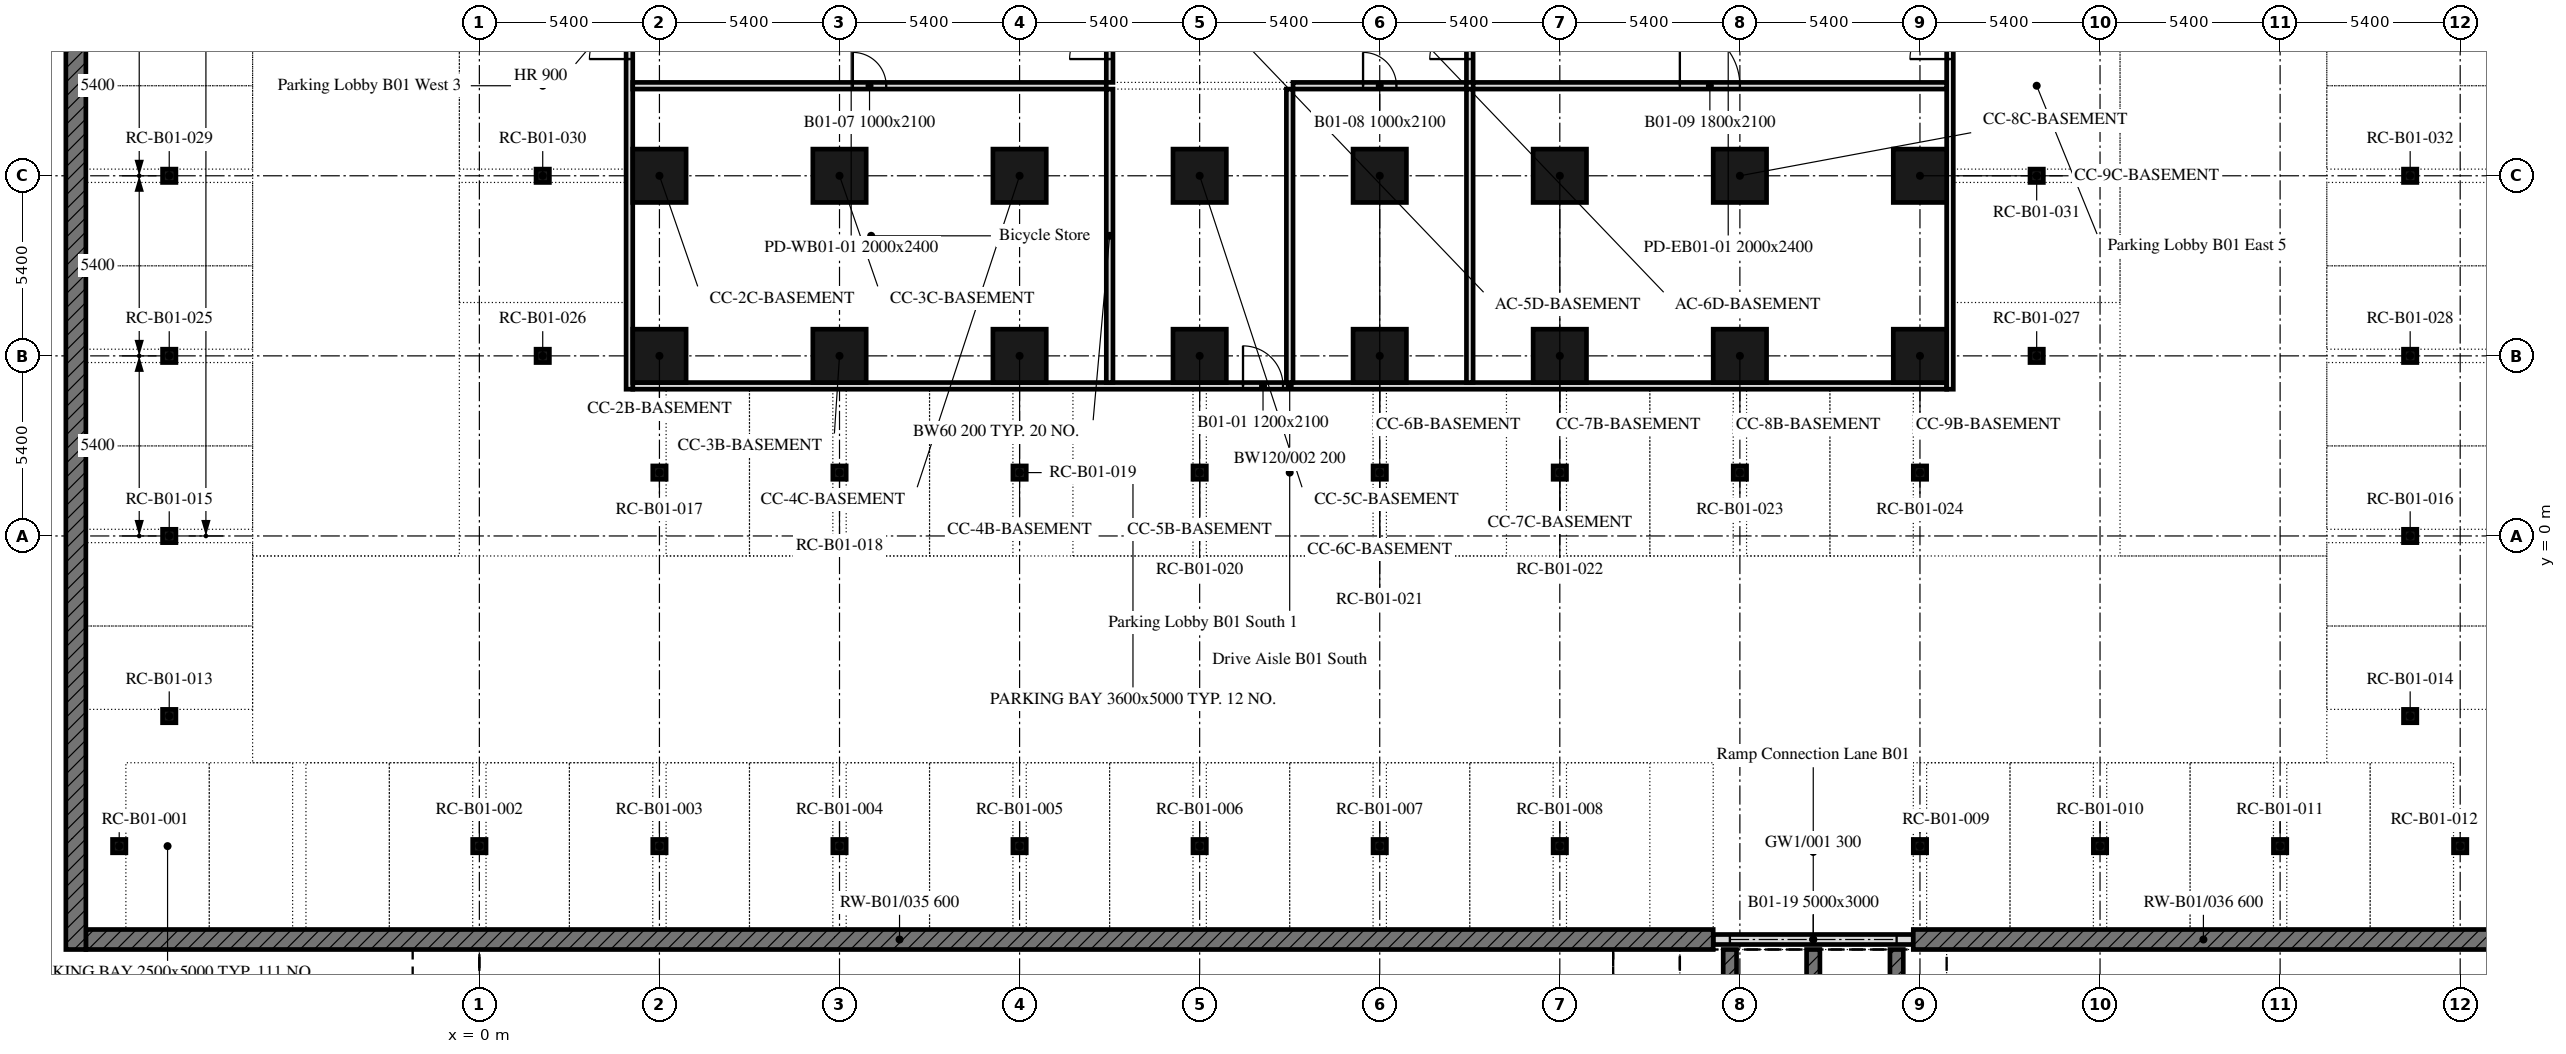
"""IFC4 building model, lengths in metres.
Left out: names, types, materials, properties, quantities, classifications, styles, units other than length and angle.
Written with IfcOpenShell. Run it as: python <this file> out.ifc"""

import sys

from ifc_helpers import new_model, si_unit, direction, frame, frame_2d, origin, origin_2d, place, context, subcontext, project, spatial, rectangle, extrude, element, fill, save


model = new_model("IFC4")
c1 = context("Model", 3, precision=1e-05, world=origin(), true_north=direction((0.0, 1.0)))
c2 = subcontext(c1, "Body", "Model", "MODEL_VIEW")
j1 = project(units=[si_unit("LENGTHUNIT", "METRE"), si_unit("PLANEANGLEUNIT", "RADIAN")], contexts=[c1])
p1 = place(None, origin())
s1 = spatial("IfcSite", under=j1, at=p1, CompositionType="ELEMENT")
p2 = place(p1, origin())
s2 = spatial("IfcBuilding", under=s1, at=p2, CompositionType="ELEMENT")
p3 = place(p2, frame((0.0, 0.0, -4.5)))
s3 = spatial("IfcBuildingStorey", under=s2, at=p3, CompositionType="ELEMENT", Elevation=-4.5)
p4 = place(p3, frame((-12.1, -12.4, 0.0), z_axis=(0.0, 0.0, 1.0), x_axis=(0.0, 1.0, 0.0)))
e1 = element("IfcWall", 1, at=p4, inside=s3, PredefinedType="SOLIDWALL", context=c2, shape_type="SweptSolid", body=[
    extrude(rectangle(XDim=73.4, YDim=0.6, at=frame_2d((36.7, 0.0))), origin(), (0.0, 0.0, 1.0), 4.0),
])
p5 = place(p3, frame((-11.8, -12.1, 0.0), z_axis=(0.0, 0.0, 1.0), x_axis=(1.0, 0.0, 0.0)))
e2 = element("IfcWall", 2, at=p5, inside=s3, PredefinedType="SOLIDWALL", context=c2, shape_type="SweptSolid", body=[
    extrude(rectangle(XDim=48.8, YDim=0.6, at=frame_2d((24.4, 0.0))), origin(), (0.0, 0.0, 1.0), 4.0),
])
p6 = place(p3, frame((43.0, -12.1, 0.0), z_axis=(0.0, 0.0, 1.0), x_axis=(1.0, 0.0, 0.0)))
e3 = element("IfcWall", 3, at=p6, inside=s3, PredefinedType="SOLIDWALL", context=c2, shape_type="SweptSolid", body=[
    extrude(rectangle(XDim=17.4, YDim=0.6, at=frame_2d((8.7, 0.0))), origin(), (0.0, 0.0, 1.0), 4.0),
])
for number, where, z_axis, x_axis in (
    (4, (5.4, 5.4, 0.0), (0.0, 0.0, 1.0), (1.0, 0.0, 0.0)),
    (5, (10.8, 5.4, 0.0), (0.0, 0.0, 1.0), (1.0, 0.0, 0.0)),
    (6, (16.2, 5.4, 0.0), (0.0, 0.0, 1.0), (1.0, 0.0, 0.0)),
    (7, (21.6, 5.4, 0.0), (0.0, 0.0, 1.0), (1.0, 0.0, 0.0)),
    (8, (27.0, 5.4, 0.0), (0.0, 0.0, 1.0), (1.0, 0.0, 0.0)),
    (9, (32.4, 5.4, 0.0), (0.0, 0.0, 1.0), (1.0, 0.0, 0.0)),
    (10, (37.8, 5.4, 0.0), (0.0, 0.0, 1.0), (1.0, 0.0, 0.0)),
    (11, (43.2, 5.4, 0.0), (0.0, 0.0, 1.0), (1.0, 0.0, 0.0)),
    (12, (5.4, 10.8, 0.0), (0.0, 0.0, 1.0), (1.0, 0.0, 0.0)),
    (13, (10.8, 10.8, 0.0), (0.0, 0.0, 1.0), (1.0, 0.0, 0.0)),
    (14, (16.2, 10.8, 0.0), (0.0, 0.0, 1.0), (1.0, 0.0, 0.0)),
    (15, (21.6, 10.8, 0.0), (0.0, 0.0, 1.0), (1.0, 0.0, 0.0)),
    (16, (27.0, 10.8, 0.0), (0.0, 0.0, 1.0), (1.0, 0.0, 0.0)),
    (17, (32.4, 10.8, 0.0), (0.0, 0.0, 1.0), (1.0, 0.0, 0.0)),
    (18, (37.8, 10.8, 0.0), (0.0, 0.0, 1.0), (1.0, 0.0, 0.0)),
    (19, (43.2, 10.8, 0.0), (0.0, 0.0, 1.0), (1.0, 0.0, 0.0)),
):
    element("IfcColumn", number, at=place(p3, frame(where, z_axis=z_axis, x_axis=x_axis)), inside=s3, PredefinedType="COLUMN", context=c2, shape_type="SweptSolid", body=[
        extrude(rectangle(XDim=1.6, YDim=1.6, at=origin_2d()), origin(), (0.0, 0.0, 1.0), 4.0),
    ])
for number, where, z_axis, x_axis in (
    (20, (-10.8, -9.3, 0.0), (0.0, 0.0, 1.0), (1.0, 0.0, 0.0)),
    (21, (0.0, -9.3, 0.0), (0.0, 0.0, 1.0), (1.0, 0.0, 0.0)),
    (22, (5.4, -9.3, 0.0), (0.0, 0.0, 1.0), (1.0, 0.0, 0.0)),
    (23, (10.8, -9.3, 0.0), (0.0, 0.0, 1.0), (1.0, 0.0, 0.0)),
    (24, (16.2, -9.3, 0.0), (0.0, 0.0, 1.0), (1.0, 0.0, 0.0)),
    (25, (21.6, -9.3, 0.0), (0.0, 0.0, 1.0), (1.0, 0.0, 0.0)),
    (26, (27.0, -9.3, 0.0), (0.0, 0.0, 1.0), (1.0, 0.0, 0.0)),
    (27, (32.4, -9.3, 0.0), (0.0, 0.0, 1.0), (1.0, 0.0, 0.0)),
    (28, (43.2, -9.3, 0.0), (0.0, 0.0, 1.0), (1.0, 0.0, 0.0)),
    (29, (48.6, -9.3, 0.0), (0.0, 0.0, 1.0), (1.0, 0.0, 0.0)),
    (30, (54.0, -9.3, 0.0), (0.0, 0.0, 1.0), (1.0, 0.0, 0.0)),
    (31, (59.4, -9.3, 0.0), (0.0, 0.0, 1.0), (1.0, 0.0, 0.0)),
    (32, (-9.3, -5.4, 0.0), (0.0, 0.0, 1.0), (1.0, 0.0, 0.0)),
    (33, (57.9, -5.4, 0.0), (0.0, 0.0, 1.0), (1.0, 0.0, 0.0)),
    (34, (-9.3, 0.0, 0.0), (0.0, 0.0, 1.0), (1.0, 0.0, 0.0)),
    (35, (57.9, 0.0, 0.0), (0.0, 0.0, 1.0), (1.0, 0.0, 0.0)),
    (36, (5.4, 1.9, 0.0), (0.0, 0.0, 1.0), (1.0, 0.0, 0.0)),
    (37, (10.8, 1.9, 0.0), (0.0, 0.0, 1.0), (1.0, 0.0, 0.0)),
    (38, (16.2, 1.9, 0.0), (0.0, 0.0, 1.0), (1.0, 0.0, 0.0)),
    (39, (21.6, 1.9, 0.0), (0.0, 0.0, 1.0), (1.0, 0.0, 0.0)),
    (40, (27.0, 1.9, 0.0), (0.0, 0.0, 1.0), (1.0, 0.0, 0.0)),
    (41, (32.4, 1.9, 0.0), (0.0, 0.0, 1.0), (1.0, 0.0, 0.0)),
    (42, (37.8, 1.9, 0.0), (0.0, 0.0, 1.0), (1.0, 0.0, 0.0)),
    (43, (43.2, 1.9, 0.0), (0.0, 0.0, 1.0), (1.0, 0.0, 0.0)),
    (44, (-9.3, 5.4, 0.0), (0.0, 0.0, 1.0), (1.0, 0.0, 0.0)),
    (45, (1.9, 5.4, 0.0), (0.0, 0.0, 1.0), (1.0, 0.0, 0.0)),
    (46, (46.7, 5.4, 0.0), (0.0, 0.0, 1.0), (1.0, 0.0, 0.0)),
    (47, (57.9, 5.4, 0.0), (0.0, 0.0, 1.0), (1.0, 0.0, 0.0)),
    (48, (-9.3, 10.8, 0.0), (0.0, 0.0, 1.0), (1.0, 0.0, 0.0)),
    (49, (1.9, 10.8, 0.0), (0.0, 0.0, 1.0), (1.0, 0.0, 0.0)),
    (50, (46.7, 10.8, 0.0), (0.0, 0.0, 1.0), (1.0, 0.0, 0.0)),
    (51, (57.9, 10.8, 0.0), (0.0, 0.0, 1.0), (1.0, 0.0, 0.0)),
):
    element("IfcColumn", number, at=place(p3, frame(where, z_axis=z_axis, x_axis=x_axis)), inside=s3, PredefinedType="COLUMN", context=c2, shape_type="SweptSolid", body=[
        extrude(rectangle(XDim=0.4, YDim=0.4, at=origin_2d()), origin(), (0.0, 0.0, 1.0), 4.0),
    ])
p7 = place(p3, frame((4.6, 4.5, 0.0), z_axis=(0.0, 0.0, 1.0), x_axis=(1.0, 0.0, 0.0)))
e52 = element("IfcWall", 52, at=p7, inside=s3, PredefinedType="PARTITIONING", context=c2, shape_type="SweptSolid", body=[
    extrude(rectangle(XDim=39.4, YDim=0.2, at=frame_2d((19.7, 0.0))), origin(), (0.0, 0.0, 1.0), 4.0),
])
p8 = place(p7, frame((18.3, 0.0, 0.0)))
e53 = element("IfcOpeningElement", 53, at=p8, cuts=e52, PredefinedType="OPENING", context=c2, shape_type="SweptSolid", body=[
    extrude(rectangle(XDim=1.2, YDim=2.1, at=frame_2d((0.6, 1.05))), frame((0.0, 0.11, 0.0), z_axis=(0.0, -1.0, 0.0), x_axis=(1.0, 0.0, 0.0)), (0.0, 0.0, 1.0), 0.22),
])
p9 = place(p3, frame((4.5, 4.4, 0.0), z_axis=(0.0, 0.0, 1.0), x_axis=(0.0, 1.0, 0.0)))
e54 = element("IfcWall", 54, at=p9, inside=s3, PredefinedType="PARTITIONING", context=c2, shape_type="SweptSolid", body=[
    extrude(rectangle(XDim=39.8, YDim=0.2, at=frame_2d((19.9, 0.0))), origin(), (0.0, 0.0, 1.0), 4.0),
])
p10 = place(p9, frame((9.9, 0.0, 0.0)))
e55 = element("IfcOpeningElement", 55, at=p10, cuts=e54, PredefinedType="OPENING", context=c2, shape_type="SweptSolid", body=[
    extrude(rectangle(XDim=1.2, YDim=2.1, at=frame_2d((0.6, 1.05))), frame((0.0, 0.11, 0.0), z_axis=(0.0, -1.0, 0.0), x_axis=(1.0, 0.0, 0.0)), (0.0, 0.0, 1.0), 0.22),
])
p11 = place(p9, frame((28.7, 0.0, 0.0)))
e56 = element("IfcOpeningElement", 56, at=p11, cuts=e54, PredefinedType="OPENING", context=c2, shape_type="SweptSolid", body=[
    extrude(rectangle(XDim=1.2, YDim=2.1, at=frame_2d((0.6, 1.05))), frame((0.0, 0.11, 0.0), z_axis=(0.0, -1.0, 0.0), x_axis=(1.0, 0.0, 0.0)), (0.0, 0.0, 1.0), 0.22),
])
p12 = place(p3, frame((44.1, 4.4, 0.0), z_axis=(0.0, 0.0, 1.0), x_axis=(0.0, 1.0, 0.0)))
e57 = element("IfcWall", 57, at=p12, inside=s3, PredefinedType="PARTITIONING", context=c2, shape_type="SweptSolid", body=[
    extrude(rectangle(XDim=39.8, YDim=0.2, at=frame_2d((19.9, 0.0))), origin(), (0.0, 0.0, 1.0), 4.0),
])
p13 = place(p12, frame((9.9, 0.0, 0.0)))
e58 = element("IfcOpeningElement", 58, at=p13, cuts=e57, PredefinedType="OPENING", context=c2, shape_type="SweptSolid", body=[
    extrude(rectangle(XDim=1.2, YDim=2.1, at=frame_2d((0.6, 1.05))), frame((0.0, 0.11, 0.0), z_axis=(0.0, -1.0, 0.0), x_axis=(1.0, 0.0, 0.0)), (0.0, 0.0, 1.0), 0.22),
])
p14 = place(p12, frame((28.7, 0.0, 0.0)))
e59 = element("IfcOpeningElement", 59, at=p14, cuts=e57, PredefinedType="OPENING", context=c2, shape_type="SweptSolid", body=[
    extrude(rectangle(XDim=1.2, YDim=2.1, at=frame_2d((0.6, 1.05))), frame((0.0, 0.11, 0.0), z_axis=(0.0, -1.0, 0.0), x_axis=(1.0, 0.0, 0.0)), (0.0, 0.0, 1.0), 0.22),
])
for number, where, z_axis, x_axis in (
    (60, (18.9, 4.6, 0.0), (0.0, 0.0, 1.0), (0.0, 1.0, 0.0)),
    (61, (24.3, 4.6, 0.0), (0.0, 0.0, 1.0), (0.0, 1.0, 0.0)),
    (62, (29.7, 4.6, 0.0), (0.0, 0.0, 1.0), (0.0, 1.0, 0.0)),
):
    element("IfcWall", number, at=place(p3, frame(where, z_axis=z_axis, x_axis=x_axis)), inside=s3, PredefinedType="PARTITIONING", context=c2, shape_type="SweptSolid", body=[
        extrude(rectangle(XDim=8.8, YDim=0.2, at=frame_2d((4.4, 0.0))), origin(), (0.0, 0.0, 1.0), 4.0),
    ])
p15 = place(p3, frame((4.6, 13.5, 0.0), z_axis=(0.0, 0.0, 1.0), x_axis=(1.0, 0.0, 0.0)))
e63 = element("IfcWall", 63, at=p15, inside=s3, PredefinedType="PARTITIONING", context=c2, shape_type="SweptSolid", body=[
    extrude(rectangle(XDim=14.2, YDim=0.2, at=frame_2d((7.1, 0.0))), origin(), (0.0, 0.0, 1.0), 4.0),
])
p16 = place(p15, frame((6.6, 0.0, 0.0)))
e64 = element("IfcOpeningElement", 64, at=p16, cuts=e63, PredefinedType="OPENING", context=c2, shape_type="SweptSolid", body=[
    extrude(rectangle(XDim=1.0, YDim=2.1, at=frame_2d((0.5, 1.05))), frame((0.0, 0.11, 0.0), z_axis=(0.0, -1.0, 0.0), x_axis=(1.0, 0.0, 0.0)), (0.0, 0.0, 1.0), 0.22),
])
p17 = place(p3, frame((24.4, 13.5, 0.0), z_axis=(0.0, 0.0, 1.0), x_axis=(1.0, 0.0, 0.0)))
e65 = element("IfcWall", 65, at=p17, inside=s3, PredefinedType="PARTITIONING", context=c2, shape_type="SweptSolid", body=[
    extrude(rectangle(XDim=5.2, YDim=0.2, at=frame_2d((2.6, 0.0))), origin(), (0.0, 0.0, 1.0), 4.0),
])
p18 = place(p17, frame((2.1, 0.0, 0.0)))
e66 = element("IfcOpeningElement", 66, at=p18, cuts=e65, PredefinedType="OPENING", context=c2, shape_type="SweptSolid", body=[
    extrude(rectangle(XDim=1.0, YDim=2.1, at=frame_2d((0.5, 1.05))), frame((0.0, 0.11, 0.0), z_axis=(0.0, -1.0, 0.0), x_axis=(1.0, 0.0, 0.0)), (0.0, 0.0, 1.0), 0.22),
])
p19 = place(p3, frame((29.8, 13.5, 0.0), z_axis=(0.0, 0.0, 1.0), x_axis=(1.0, 0.0, 0.0)))
e67 = element("IfcWall", 67, at=p19, inside=s3, PredefinedType="PARTITIONING", context=c2, shape_type="SweptSolid", body=[
    extrude(rectangle(XDim=14.2, YDim=0.2, at=frame_2d((7.1, 0.0))), origin(), (0.0, 0.0, 1.0), 4.0),
])
p20 = place(p19, frame((6.2, 0.0, 0.0)))
e68 = element("IfcOpeningElement", 68, at=p20, cuts=e67, PredefinedType="OPENING", context=c2, shape_type="SweptSolid", body=[
    extrude(rectangle(XDim=1.8, YDim=2.1, at=frame_2d((0.9, 1.05))), frame((0.0, 0.11, 0.0), z_axis=(0.0, -1.0, 0.0), x_axis=(1.0, 0.0, 0.0)), (0.0, 0.0, 1.0), 0.22),
])
p21 = place(p3, frame((18.9, 13.6, 0.0), z_axis=(0.0, 0.0, 1.0), x_axis=(0.0, 1.0, 0.0)))
e69 = element("IfcWall", 69, at=p21, inside=s3, PredefinedType="PARTITIONING", context=c2, shape_type="SweptSolid", body=[
    extrude(rectangle(XDim=2.6, YDim=0.2, at=frame_2d((1.3, 0.0))), origin(), (0.0, 0.0, 1.0), 4.0),
])
p22 = place(p21, frame((0.7, 0.0, 0.0)))
e70 = element("IfcOpeningElement", 70, at=p22, cuts=e69, PredefinedType="OPENING", context=c2, shape_type="SweptSolid", body=[
    extrude(rectangle(XDim=1.2, YDim=2.1, at=frame_2d((0.6, 1.05))), frame((0.0, 0.11, 0.0), z_axis=(0.0, -1.0, 0.0), x_axis=(1.0, 0.0, 0.0)), (0.0, 0.0, 1.0), 0.22),
])
p23 = place(p3, frame((29.7, 13.6, 0.0), z_axis=(0.0, 0.0, 1.0), x_axis=(0.0, 1.0, 0.0)))
e71 = element("IfcWall", 71, at=p23, inside=s3, PredefinedType="PARTITIONING", context=c2, shape_type="SweptSolid", body=[
    extrude(rectangle(XDim=2.6, YDim=0.2, at=frame_2d((1.3, 0.0))), origin(), (0.0, 0.0, 1.0), 4.0),
])
p24 = place(p23, frame((0.7, 0.0, 0.0)))
e72 = element("IfcOpeningElement", 72, at=p24, cuts=e71, PredefinedType="OPENING", context=c2, shape_type="SweptSolid", body=[
    extrude(rectangle(XDim=1.2, YDim=2.1, at=frame_2d((0.6, 1.05))), frame((0.0, 0.11, 0.0), z_axis=(0.0, -1.0, 0.0), x_axis=(1.0, 0.0, 0.0)), (0.0, 0.0, 1.0), 0.22),
])
p25 = place(p3, frame((37.0, -12.1, 0.0), z_axis=(0.0, 0.0, 1.0), x_axis=(1.0, 0.0, 0.0)))
e73 = element("IfcWall", 73, at=p25, inside=s3, PredefinedType="SOLIDWALL", context=c2, shape_type="SweptSolid", body=[
    extrude(rectangle(XDim=6.0, YDim=0.3, at=frame_2d((3.0, 0.0))), origin(), (0.0, 0.0, 1.0), 4.0),
])
p26 = place(p25, frame((0.5, 0.0, 0.0)))
e74 = element("IfcOpeningElement", 74, at=p26, cuts=e73, PredefinedType="OPENING", context=c2, shape_type="SweptSolid", body=[
    extrude(rectangle(XDim=5.0, YDim=3.0, at=frame_2d((2.5, 1.5))), frame((0.0, 0.16, 0.0), z_axis=(0.0, -1.0, 0.0), x_axis=(1.0, 0.0, 0.0)), (0.0, 0.0, 1.0), 0.32),
])
for number, where, z_axis, x_axis in (
    (75, (37.5, -25.2, -4.9), (0.0, 0.0, 1.0), (0.0, 1.0, 0.0)),
    (76, (40.0, -25.2, -4.9), (0.0, 0.0, 1.0), (0.0, 1.0, 0.0)),
    (77, (42.5, -25.2, -4.9), (0.0, 0.0, 1.0), (0.0, 1.0, 0.0)),
):
    element("IfcWall", number, at=place(p3, frame(where, z_axis=z_axis, x_axis=x_axis)), inside=s3, PredefinedType="SOLIDWALL", context=c2, shape_type="SweptSolid", body=[
        extrude(rectangle(XDim=12.8, YDim=0.4, at=frame_2d((6.4, 0.0))), origin(), (0.0, 0.0, 1.0), 4.5),
    ])
p27 = place(p2, origin())
s4 = spatial("IfcBuildingStorey", under=s2, at=p27, CompositionType="ELEMENT", Elevation=0.0)
p28 = place(p27, frame((44.2, -25.6, -9.4), z_axis=(0.0, 0.0, 1.0), x_axis=(0.0, 1.0, 0.0)))
e78 = element("IfcWall", 78, at=p28, inside=s4, PredefinedType="SOLIDWALL", context=c2, shape_type="SweptSolid", body=[
    extrude(rectangle(XDim=13.2, YDim=0.4, at=frame_2d((6.6, 0.0))), origin(), (0.0, 0.0, 1.0), 10.5),
])
p29 = place(p27, frame((-8.2, -18.6, -9.4), z_axis=(0.0, 0.0, 1.0), x_axis=(0.0, 1.0, 0.0)))
e79 = element("IfcWall", 79, at=p29, inside=s4, PredefinedType="SOLIDWALL", context=c2, shape_type="SweptSolid", body=[
    extrude(rectangle(XDim=6.2, YDim=0.4, at=frame_2d((3.1, 0.0))), origin(), (0.0, 0.0, 1.0), 10.5),
])
p30 = place(p8, origin())
e80 = element("IfcDoor", 80, at=p30, inside=s3, OperationType="SINGLE_SWING_LEFT", PredefinedType="DOOR", context=c2, shape_type="SweptSolid", body=[
    extrude(rectangle(XDim=1.2, YDim=2.1, at=frame_2d((0.6, 1.05))), frame((0.0, 0.025, 0.0), z_axis=(0.0, -1.0, 0.0), x_axis=(1.0, 0.0, 0.0)), (0.0, 0.0, 1.0), 0.05),
])
fill(e53, e80)
p31 = place(p10, origin())
e81 = element("IfcDoor", 81, at=p31, inside=s3, OperationType="SINGLE_SWING_LEFT", PredefinedType="DOOR", context=c2, shape_type="SweptSolid", body=[
    extrude(rectangle(XDim=1.2, YDim=2.1, at=frame_2d((0.6, 1.05))), frame((0.0, 0.025, 0.0), z_axis=(0.0, -1.0, 0.0), x_axis=(1.0, 0.0, 0.0)), (0.0, 0.0, 1.0), 0.05),
])
fill(e55, e81)
p32 = place(p13, origin())
e82 = element("IfcDoor", 82, at=p32, inside=s3, OperationType="SINGLE_SWING_LEFT", PredefinedType="DOOR", context=c2, shape_type="SweptSolid", body=[
    extrude(rectangle(XDim=1.2, YDim=2.1, at=frame_2d((0.6, 1.05))), frame((0.0, 0.025, 0.0), z_axis=(0.0, -1.0, 0.0), x_axis=(1.0, 0.0, 0.0)), (0.0, 0.0, 1.0), 0.05),
])
fill(e58, e82)
p33 = place(p16, origin())
e83 = element("IfcDoor", 83, at=p33, inside=s3, OperationType="SINGLE_SWING_LEFT", PredefinedType="DOOR", context=c2, shape_type="SweptSolid", body=[
    extrude(rectangle(XDim=1.0, YDim=2.1, at=frame_2d((0.5, 1.05))), frame((0.0, 0.025, 0.0), z_axis=(0.0, -1.0, 0.0), x_axis=(1.0, 0.0, 0.0)), (0.0, 0.0, 1.0), 0.05),
])
fill(e64, e83)
p34 = place(p18, origin())
e84 = element("IfcDoor", 84, at=p34, inside=s3, OperationType="SINGLE_SWING_LEFT", PredefinedType="DOOR", context=c2, shape_type="SweptSolid", body=[
    extrude(rectangle(XDim=1.0, YDim=2.1, at=frame_2d((0.5, 1.05))), frame((0.0, 0.025, 0.0), z_axis=(0.0, -1.0, 0.0), x_axis=(1.0, 0.0, 0.0)), (0.0, 0.0, 1.0), 0.05),
])
fill(e66, e84)
p35 = place(p20, origin())
e85 = element("IfcDoor", 85, at=p35, inside=s3, OperationType="DOUBLE_DOOR_SINGLE_SWING", PredefinedType="DOOR", context=c2, shape_type="SweptSolid", body=[
    extrude(rectangle(XDim=1.8, YDim=2.1, at=frame_2d((0.9, 1.05))), frame((0.0, 0.025, 0.0), z_axis=(0.0, -1.0, 0.0), x_axis=(1.0, 0.0, 0.0)), (0.0, 0.0, 1.0), 0.05),
])
fill(e68, e85)
p36 = place(p22, origin())
e86 = element("IfcDoor", 86, at=p36, inside=s3, OperationType="SINGLE_SWING_LEFT", PredefinedType="DOOR", context=c2, shape_type="SweptSolid", body=[
    extrude(rectangle(XDim=1.2, YDim=2.1, at=frame_2d((0.6, 1.05))), frame((0.0, 0.025, 0.0), z_axis=(0.0, -1.0, 0.0), x_axis=(1.0, 0.0, 0.0)), (0.0, 0.0, 1.0), 0.05),
])
fill(e70, e86)
p37 = place(p24, origin())
e87 = element("IfcDoor", 87, at=p37, inside=s3, OperationType="SINGLE_SWING_LEFT", PredefinedType="DOOR", context=c2, shape_type="SweptSolid", body=[
    extrude(rectangle(XDim=1.2, YDim=2.1, at=frame_2d((0.6, 1.05))), frame((0.0, 0.025, 0.0), z_axis=(0.0, -1.0, 0.0), x_axis=(1.0, 0.0, 0.0)), (0.0, 0.0, 1.0), 0.05),
])
fill(e72, e87)
p38 = place(p26, origin())
e88 = element("IfcDoor", 88, at=p38, inside=s3, OperationType="ROLLINGUP", PredefinedType="DOOR", context=c2, shape_type="SweptSolid", body=[
    extrude(rectangle(XDim=5.0, YDim=3.0, at=frame_2d((2.5, 1.5))), frame((0.0, 0.025, 0.0), z_axis=(0.0, -1.0, 0.0), x_axis=(1.0, 0.0, 0.0)), (0.0, 0.0, 1.0), 0.05),
])
fill(e74, e88)
save(model, sys.argv[1])
